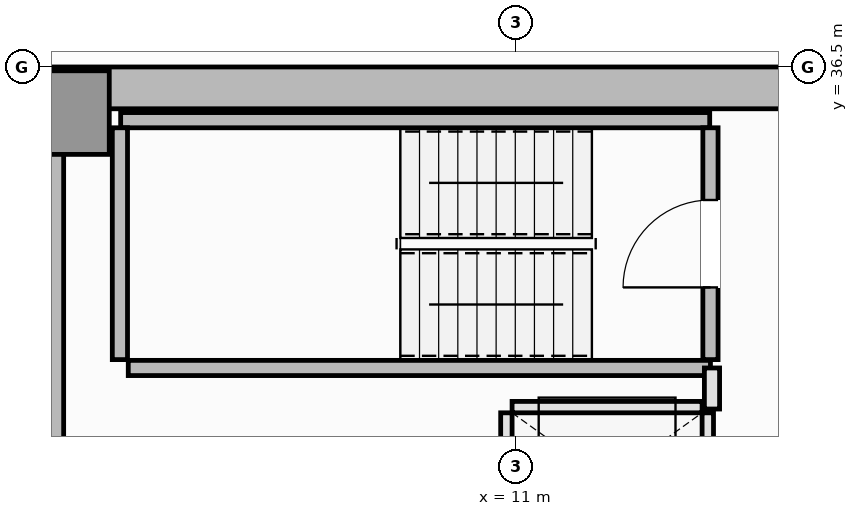
"""IFC4 building model, lengths in metres.
Left out: names, types, materials, properties, quantities, classifications, styles, units other than length and angle.
Written with IfcOpenShell. Run it as: python <this file> out.ifc"""

import sys

from ifc_helpers import new_model, si_unit, direction, frame, frame_2d, origin, origin_2d, place, context, subcontext, project, spatial, rectangle, extrude, element, fill, save


model = new_model("IFC4")
c1 = context("Model", 3, precision=1e-05, world=origin(), true_north=direction((0.0, 1.0)))
c2 = subcontext(c1, "Body", "Model", "MODEL_VIEW")
j1 = project(units=[si_unit("LENGTHUNIT", "METRE"), si_unit("PLANEANGLEUNIT", "RADIAN")], contexts=[c1])
p1 = place(None, origin())
s1 = spatial("IfcSite", under=j1, at=p1, CompositionType="ELEMENT")
p2 = place(p1, origin())
s2 = spatial("IfcBuilding", under=s1, at=p2, CompositionType="ELEMENT")
p3 = place(p2, frame((0.0, 0.0, 241.3)))
s3 = spatial("IfcBuildingStorey", under=s2, at=p3, CompositionType="ELEMENT", Elevation=241.3)
p4 = place(p3, frame((4.5, 36.225, 0.0), z_axis=(0.0, 0.0, 1.0), x_axis=(1.0, 0.0, 0.0)))
e1 = element("IfcWall", 1, at=p4, inside=s3, PredefinedType="SHEAR", context=c2, shape_type="SweptSolid", body=[
    extrude(rectangle(XDim=13.5, YDim=0.55, at=frame_2d((6.75, 0.0))), origin(), (0.0, 0.0, 1.0), 3.55),
])
p5 = place(p3, frame((4.775, 14.55, 0.0), z_axis=(0.0, 0.0, 1.0), x_axis=(0.0, 1.0, 0.0)))
e2 = element("IfcWall", 2, at=p5, inside=s3, PredefinedType="SHEAR", context=c2, shape_type="SweptSolid", body=[
    extrude(rectangle(XDim=21.4, YDim=0.55, at=frame_2d((10.7, 0.0))), origin(), (0.0, 0.0, 1.0), 3.55),
])
p6 = place(p3, frame((5.1, 35.9, 0.0), z_axis=(0.0, 0.0, 1.0), x_axis=(1.0, 0.0, 0.0)))
e3 = element("IfcColumn", 3, at=p6, inside=s3, PredefinedType="PILASTER", context=c2, shape_type="SweptSolid", body=[
    extrude(rectangle(XDim=1.1, YDim=1.1, at=origin_2d()), origin(), (0.0, 0.0, 1.0), 3.55),
])
p7 = place(p3, frame((5.8, 35.8, 0.0), z_axis=(0.0, 0.0, 1.0), x_axis=(1.0, 0.0, 0.0)))
e4 = element("IfcWall", 4, at=p7, inside=s3, PredefinedType="SOLIDWALL", context=c2, shape_type="SweptSolid", body=[
    extrude(rectangle(XDim=7.75, YDim=0.2, at=frame_2d((3.875, 0.0))), origin(), (0.0, 0.0, 1.0), 3.55),
])
p8 = place(p3, frame((5.79, 32.65, 0.0), z_axis=(0.0, 0.0, 1.0), x_axis=(0.0, 1.0, 0.0)))
e5 = element("IfcWall", 5, at=p8, inside=s3, PredefinedType="SOLIDWALL", context=c2, shape_type="SweptSolid", body=[
    extrude(rectangle(XDim=3.05, YDim=0.2, at=frame_2d((1.525, 0.0))), origin(), (0.0, 0.0, 1.0), 3.55),
])
p9 = place(p3, frame((5.9, 32.54, 0.0), z_axis=(0.0, 0.0, 1.0), x_axis=(1.0, 0.0, 0.0)))
e6 = element("IfcWall", 6, at=p9, inside=s3, PredefinedType="SOLIDWALL", context=c2, shape_type="SweptSolid", body=[
    extrude(rectangle(XDim=7.66, YDim=0.2, at=frame_2d((3.83, 0.0))), origin(), (0.0, 0.0, 1.0), 3.55),
])
p10 = place(p3, frame((13.56, 32.65, 0.0), z_axis=(0.0, 0.0, 1.0), x_axis=(0.0, 1.0, 0.0)))
e7 = element("IfcWall", 7, at=p10, inside=s3, PredefinedType="SOLIDWALL", context=c2, shape_type="SweptSolid", body=[
    extrude(rectangle(XDim=3.05, YDim=0.2, at=frame_2d((1.525, 0.0))), origin(), (0.0, 0.0, 1.0), 3.55),
])
p11 = place(p10, frame((0.95, 0.0, 0.0)))
e8 = element("IfcOpeningElement", 8, at=p11, cuts=e7, PredefinedType="OPENING", context=c2, shape_type="SweptSolid", body=[
    extrude(rectangle(XDim=1.15, YDim=2.15, at=frame_2d((0.575, 1.075))), frame((0.0, 0.11, 0.0), z_axis=(0.0, -1.0, 0.0), x_axis=(1.0, 0.0, 0.0)), (0.0, 0.0, 1.0), 0.22),
])
p12 = place(p3, frame((10.95, 32.025, 0.0), z_axis=(0.0, 0.0, 1.0), x_axis=(1.0, 0.0, 0.0)))
e9 = element("IfcWall", 9, at=p12, inside=s3, PredefinedType="PARTITIONING", context=c2, shape_type="SweptSolid", body=[
    extrude(rectangle(XDim=2.5, YDim=0.15, at=frame_2d((1.25, 0.0))), origin(), (0.0, 0.0, 1.0), 3.39),
])
p13 = place(p3, frame((10.875, 30.15, 0.0), z_axis=(0.0, 0.0, 1.0), x_axis=(0.0, 1.0, 0.0)))
e10 = element("IfcWall", 10, at=p13, inside=s3, PredefinedType="PARTITIONING", context=c2, shape_type="SweptSolid", body=[
    extrude(rectangle(XDim=1.8, YDim=0.15, at=frame_2d((0.9, 0.0))), origin(), (0.0, 0.0, 1.0), 3.39),
])
p14 = place(p3, frame((13.525, 30.15, 0.0), z_axis=(0.0, 0.0, 1.0), x_axis=(0.0, 1.0, 0.0)))
e11 = element("IfcWall", 11, at=p14, inside=s3, PredefinedType="PARTITIONING", context=c2, shape_type="SweptSolid", body=[
    extrude(rectangle(XDim=1.8, YDim=0.15, at=frame_2d((0.9, 0.0))), origin(), (0.0, 0.0, 1.0), 3.39),
])
p15 = place(p14, frame((0.35, 0.0, 0.0)))
e12 = element("IfcOpeningElement", 12, at=p15, cuts=e11, PredefinedType="OPENING", context=c2, shape_type="SweptSolid", body=[
    extrude(rectangle(XDim=1.1, YDim=2.2, at=frame_2d((0.55, 1.1))), frame((0.0, 0.085, 0.0), z_axis=(0.0, -1.0, 0.0), x_axis=(1.0, 0.0, 0.0)), (0.0, 0.0, 1.0), 0.17),
])
p16 = place(p3, frame((13.58, 32.0, 0.0), z_axis=(0.0, 0.0, 1.0), x_axis=(0.0, 1.0, 0.0)))
e13 = element("IfcWall", 13, at=p16, inside=s3, PredefinedType="PARTITIONING", context=c2, shape_type="SweptSolid", body=[
    extrude(rectangle(XDim=0.54, YDim=0.2, at=frame_2d((0.27, 0.0))), origin(), (0.0, 0.0, 1.0), 3.39),
])
p17 = place(p11, origin())
e14 = element("IfcDoor", 14, at=p17, inside=s3, OperationType="SINGLE_SWING_LEFT", PredefinedType="DOOR", context=c2, shape_type="SweptSolid", body=[
    extrude(rectangle(XDim=1.15, YDim=2.15, at=frame_2d((0.575, 1.075))), frame((0.0, 0.025, 0.0), z_axis=(0.0, -1.0, 0.0), x_axis=(1.0, 0.0, 0.0)), (0.0, 0.0, 1.0), 0.05),
])
fill(e8, e14)
save(model, sys.argv[1])
